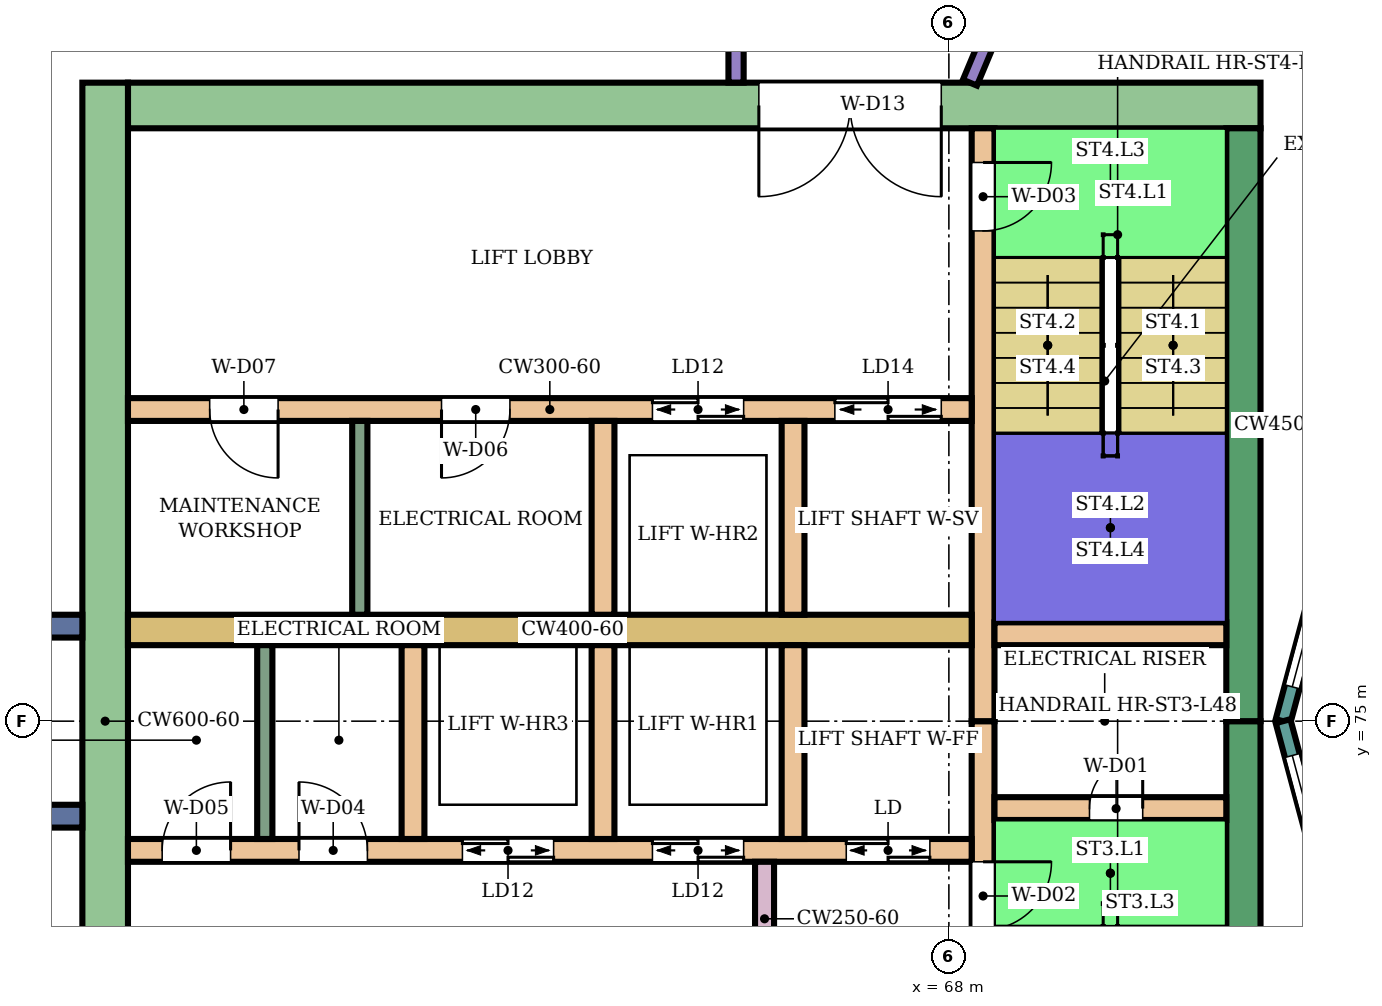
"""IFC4 building model, lengths in metres.
Left out: names, types, materials, properties, quantities, classifications, styles, units other than length and angle.
Written with IfcOpenShell. Run it as: python <this file> out.ifc"""

import sys

from ifc_helpers import new_model, si_unit, direction, frame, frame_2d, origin, place, context, subcontext, project, spatial, rectangle, extrude, element, fill, save


model = new_model("IFC4")
c1 = context("Model", 3, precision=1e-05, world=origin(), true_north=direction((0.0, 1.0)))
c2 = subcontext(c1, "Body", "Model", "MODEL_VIEW")
j1 = project(units=[si_unit("LENGTHUNIT", "METRE"), si_unit("PLANEANGLEUNIT", "RADIAN")], contexts=[c1])
p1 = place(None, origin())
s1 = spatial("IfcSite", under=j1, at=p1, CompositionType="ELEMENT")
p2 = place(p1, origin())
s2 = spatial("IfcBuilding", under=s1, at=p2, CompositionType="ELEMENT")
p3 = place(p2, frame((0.0, 0.0, 206.9)))
s3 = spatial("IfcBuildingStorey", under=s2, at=p3, CompositionType="ELEMENT", Elevation=206.9)
p4 = place(p3, frame((72.1, 83.1, 0.0), z_axis=(0.0, 0.0, 1.0), x_axis=(-1.0, 0.0, 0.0)))
e1 = element("IfcWall", 1, at=p4, inside=s3, PredefinedType="SHEAR", context=c2, shape_type="SweptSolid", body=[
    extrude(rectangle(XDim=14.9, YDim=0.6, at=frame_2d((7.45, 0.0))), origin(), (0.0, 0.0, 1.0), 5.28),
])
p5 = place(p4, frame((4.2, 0.0, 0.0)))
e2 = element("IfcOpeningElement", 2, at=p5, cuts=e1, PredefinedType="OPENING", context=c2, shape_type="SweptSolid", body=[
    extrude(rectangle(XDim=2.4, YDim=2.4, at=frame_2d((1.2, 1.2))), frame((0.0, 0.31, 0.0), z_axis=(0.0, -1.0, 0.0), x_axis=(1.0, 0.0, 0.0)), (0.0, 0.0, 1.0), 0.62),
])
for number, where, z_axis, x_axis in (
    (3, (71.875, 75.0, 0.0), (0.0, 0.0, 1.0), (0.0, -1.0, 0.0)),
    (4, (71.875, 82.8, 0.0), (0.0, 0.0, 1.0), (0.0, -1.0, 0.0)),
):
    element("IfcWall", number, at=place(p3, frame(where, z_axis=z_axis, x_axis=x_axis)), inside=s3, PredefinedType="SHEAR", context=c2, shape_type="SweptSolid", body=[
        extrude(rectangle(XDim=7.8, YDim=0.45, at=frame_2d((3.9, 0.0))), origin(), (0.0, 0.0, 1.0), 5.28),
    ])
p6 = place(p3, frame((56.9, 83.4, 0.0), z_axis=(0.0, 0.0, 1.0), x_axis=(0.0, -1.0, 0.0)))
e5 = element("IfcWall", 5, at=p6, inside=s3, PredefinedType="SHEAR", context=c2, shape_type="SweptSolid", body=[
    extrude(rectangle(XDim=16.8, YDim=0.6, at=frame_2d((8.4, 0.0))), origin(), (0.0, 0.0, 1.0), 5.28),
])
p7 = place(p3, frame((68.45, 75.0, 0.0), z_axis=(0.0, 0.0, 1.0), x_axis=(0.0, -1.0, 0.0)))
e6 = element("IfcWall", 6, at=p7, inside=s3, PredefinedType="SHEAR", context=c2, shape_type="SweptSolid", body=[
    extrude(rectangle(XDim=7.8, YDim=0.3, at=frame_2d((3.9, 0.0))), origin(), (0.0, 0.0, 1.0), 5.28),
])
p8 = place(p7, frame((1.85, 0.0, 0.0)))
e7 = element("IfcOpeningElement", 7, at=p8, cuts=e6, PredefinedType="OPENING", context=c2, shape_type="SweptSolid", body=[
    extrude(rectangle(XDim=0.9, YDim=2.1, at=frame_2d((0.45, 1.05))), frame((0.0, 0.16, 0.0), z_axis=(0.0, -1.0, 0.0), x_axis=(1.0, 0.0, 0.0)), (0.0, 0.0, 1.0), 0.32),
])
p9 = place(p3, frame((68.45, 82.8, 0.0), z_axis=(0.0, 0.0, 1.0), x_axis=(0.0, -1.0, 0.0)))
e8 = element("IfcWall", 8, at=p9, inside=s3, PredefinedType="SHEAR", context=c2, shape_type="SweptSolid", body=[
    extrude(rectangle(XDim=7.8, YDim=0.3, at=frame_2d((3.9, 0.0))), origin(), (0.0, 0.0, 1.0), 5.28),
])
p10 = place(p9, frame((0.45, 0.0, 0.0)))
e9 = element("IfcOpeningElement", 9, at=p10, cuts=e8, PredefinedType="OPENING", context=c2, shape_type="SweptSolid", body=[
    extrude(rectangle(XDim=0.9, YDim=2.1, at=frame_2d((0.45, 1.05))), frame((0.0, 0.16, 0.0), z_axis=(0.0, -1.0, 0.0), x_axis=(1.0, 0.0, 0.0)), (0.0, 0.0, 1.0), 0.32),
])
p11 = place(p3, frame((71.65, 73.85, 0.0), z_axis=(0.0, 0.0, 1.0), x_axis=(-1.0, 0.0, 0.0)))
e10 = element("IfcWall", 10, at=p11, inside=s3, PredefinedType="SHEAR", context=c2, shape_type="SweptSolid", body=[
    extrude(rectangle(XDim=3.05, YDim=0.3, at=frame_2d((1.525, 0.0))), origin(), (0.0, 0.0, 1.0), 5.28),
])
p12 = place(p11, frame((1.1, 0.0, 0.0)))
e11 = element("IfcOpeningElement", 11, at=p12, cuts=e10, PredefinedType="OPENING", context=c2, shape_type="SweptSolid", body=[
    extrude(rectangle(XDim=0.7, YDim=2.0, at=frame_2d((0.35, 1.0))), frame((0.0, 0.16, 0.0), z_axis=(0.0, -1.0, 0.0), x_axis=(1.0, 0.0, 0.0)), (0.0, 0.0, 1.0), 0.32),
])
p13 = place(p3, frame((71.65, 76.15, 0.0), z_axis=(0.0, 0.0, 1.0), x_axis=(-1.0, 0.0, 0.0)))
e12 = element("IfcWall", 12, at=p13, inside=s3, PredefinedType="SHEAR", context=c2, shape_type="SweptSolid", body=[
    extrude(rectangle(XDim=3.05, YDim=0.3, at=frame_2d((1.525, 0.0))), origin(), (0.0, 0.0, 1.0), 5.28),
])
p14 = place(p3, frame((68.3, 73.3, 0.0), z_axis=(0.0, 0.0, 1.0), x_axis=(-1.0, 0.0, 0.0)))
e13 = element("IfcWall", 13, at=p14, inside=s3, PredefinedType="SHEAR", context=c2, shape_type="SweptSolid", body=[
    extrude(rectangle(XDim=11.1, YDim=0.3, at=frame_2d((5.55, 0.0))), origin(), (0.0, 0.0, 1.0), 5.28),
])
p15 = place(p14, frame((0.55, 0.0, 0.0)))
e14 = element("IfcOpeningElement", 14, at=p15, cuts=e13, PredefinedType="OPENING", context=c2, shape_type="SweptSolid", body=[
    extrude(rectangle(XDim=1.1, YDim=2.1, at=frame_2d((0.55, 1.05))), frame((0.0, 0.16, 0.0), z_axis=(0.0, -1.0, 0.0), x_axis=(1.0, 0.0, 0.0)), (0.0, 0.0, 1.0), 0.32),
])
p16 = place(p14, frame((3.0, 0.0, 0.0)))
e15 = element("IfcOpeningElement", 15, at=p16, cuts=e13, PredefinedType="OPENING", context=c2, shape_type="SweptSolid", body=[
    extrude(rectangle(XDim=1.2, YDim=2.1, at=frame_2d((0.6, 1.05))), frame((0.0, 0.16, 0.0), z_axis=(0.0, -1.0, 0.0), x_axis=(1.0, 0.0, 0.0)), (0.0, 0.0, 1.0), 0.32),
])
p17 = place(p14, frame((5.5, 0.0, 0.0)))
e16 = element("IfcOpeningElement", 16, at=p17, cuts=e13, PredefinedType="OPENING", context=c2, shape_type="SweptSolid", body=[
    extrude(rectangle(XDim=1.2, YDim=2.1, at=frame_2d((0.6, 1.05))), frame((0.0, 0.16, 0.0), z_axis=(0.0, -1.0, 0.0), x_axis=(1.0, 0.0, 0.0)), (0.0, 0.0, 1.0), 0.32),
])
p18 = place(p14, frame((7.95, 0.0, 0.0)))
e17 = element("IfcOpeningElement", 17, at=p18, cuts=e13, PredefinedType="OPENING", context=c2, shape_type="SweptSolid", body=[
    extrude(rectangle(XDim=0.9, YDim=2.1, at=frame_2d((0.45, 1.05))), frame((0.0, 0.16, 0.0), z_axis=(0.0, -1.0, 0.0), x_axis=(1.0, 0.0, 0.0)), (0.0, 0.0, 1.0), 0.32),
])
p19 = place(p14, frame((9.75, 0.0, 0.0)))
e18 = element("IfcOpeningElement", 18, at=p19, cuts=e13, PredefinedType="OPENING", context=c2, shape_type="SweptSolid", body=[
    extrude(rectangle(XDim=0.9, YDim=2.1, at=frame_2d((0.45, 1.05))), frame((0.0, 0.16, 0.0), z_axis=(0.0, -1.0, 0.0), x_axis=(1.0, 0.0, 0.0)), (0.0, 0.0, 1.0), 0.32),
])
p20 = place(p3, frame((68.3, 76.2, 0.0), z_axis=(0.0, 0.0, 1.0), x_axis=(-1.0, 0.0, 0.0)))
e19 = element("IfcWall", 19, at=p20, inside=s3, PredefinedType="SHEAR", context=c2, shape_type="SweptSolid", body=[
    extrude(rectangle(XDim=11.1, YDim=0.4, at=frame_2d((5.55, 0.0))), origin(), (0.0, 0.0, 1.0), 5.28),
])
p21 = place(p3, frame((68.3, 79.1, 0.0), z_axis=(0.0, 0.0, 1.0), x_axis=(-1.0, 0.0, 0.0)))
e20 = element("IfcWall", 20, at=p21, inside=s3, PredefinedType="SHEAR", context=c2, shape_type="SweptSolid", body=[
    extrude(rectangle(XDim=11.1, YDim=0.3, at=frame_2d((5.55, 0.0))), origin(), (0.0, 0.0, 1.0), 5.28),
])
p22 = place(p21, frame((0.4, 0.0, 0.0)))
e21 = element("IfcOpeningElement", 21, at=p22, cuts=e20, PredefinedType="OPENING", context=c2, shape_type="SweptSolid", body=[
    extrude(rectangle(XDim=1.4, YDim=2.1, at=frame_2d((0.7, 1.05))), frame((0.0, 0.16, 0.0), z_axis=(0.0, -1.0, 0.0), x_axis=(1.0, 0.0, 0.0)), (0.0, 0.0, 1.0), 0.32),
])
p23 = place(p21, frame((3.0, 0.0, 0.0)))
e22 = element("IfcOpeningElement", 22, at=p23, cuts=e20, PredefinedType="OPENING", context=c2, shape_type="SweptSolid", body=[
    extrude(rectangle(XDim=1.2, YDim=2.1, at=frame_2d((0.6, 1.05))), frame((0.0, 0.16, 0.0), z_axis=(0.0, -1.0, 0.0), x_axis=(1.0, 0.0, 0.0)), (0.0, 0.0, 1.0), 0.32),
])
p24 = place(p21, frame((6.075, 0.0, 0.0)))
e23 = element("IfcOpeningElement", 23, at=p24, cuts=e20, PredefinedType="OPENING", context=c2, shape_type="SweptSolid", body=[
    extrude(rectangle(XDim=0.9, YDim=2.1, at=frame_2d((0.45, 1.05))), frame((0.0, 0.16, 0.0), z_axis=(0.0, -1.0, 0.0), x_axis=(1.0, 0.0, 0.0)), (0.0, 0.0, 1.0), 0.32),
])
p25 = place(p21, frame((9.125, 0.0, 0.0)))
e24 = element("IfcOpeningElement", 24, at=p25, cuts=e20, PredefinedType="OPENING", context=c2, shape_type="SweptSolid", body=[
    extrude(rectangle(XDim=0.9, YDim=2.1, at=frame_2d((0.45, 1.05))), frame((0.0, 0.16, 0.0), z_axis=(0.0, -1.0, 0.0), x_axis=(1.0, 0.0, 0.0)), (0.0, 0.0, 1.0), 0.32),
])
for number, where, z_axis, x_axis in (
    (25, (65.95, 76.0, 0.0), (0.0, 0.0, 1.0), (0.0, -1.0, 0.0)),
    (26, (63.45, 76.0, 0.0), (0.0, 0.0, 1.0), (0.0, -1.0, 0.0)),
    (27, (60.95, 76.0, 0.0), (0.0, 0.0, 1.0), (0.0, -1.0, 0.0)),
    (28, (65.95, 78.95, 0.0), (0.0, 0.0, 1.0), (0.0, -1.0, 0.0)),
    (29, (63.45, 78.95, 0.0), (0.0, 0.0, 1.0), (0.0, -1.0, 0.0)),
):
    element("IfcWall", number, at=place(p3, frame(where, z_axis=z_axis, x_axis=x_axis)), inside=s3, PredefinedType="SHEAR", context=c2, shape_type="SweptSolid", body=[
        extrude(rectangle(XDim=2.55, YDim=0.3, at=frame_2d((1.275, 0.0))), origin(), (0.0, 0.0, 1.0), 5.28),
    ])
p26 = place(p3, frame((65.575, 73.15, 0.0), z_axis=(0.0, 0.0, 1.0), x_axis=(0.0, -1.0, 0.0)))
e30 = element("IfcWall", 30, at=p26, inside=s3, PredefinedType="SHEAR", context=c2, shape_type="SweptSolid", body=[
    extrude(rectangle(XDim=1.5, YDim=0.25, at=frame_2d((0.75, 0.0))), origin(), (0.0, 0.0, 1.0), 5.28),
])
for number, where, z_axis, x_axis in (
    (31, (56.6, 76.25, 0.0), (0.0, 0.0, 1.0), (-1.0, 0.0, 0.0)),
    (32, (56.6, 73.75, 0.0), (0.0, 0.0, 1.0), (-1.0, 0.0, 0.0)),
):
    element("IfcWall", number, at=place(p3, frame(where, z_axis=z_axis, x_axis=x_axis)), inside=s3, PredefinedType="NOTDEFINED", context=c2, shape_type="SweptSolid", body=[
        extrude(rectangle(XDim=2.416, YDim=0.3, at=frame_2d((1.208, 0.0))), origin(), (0.0, 0.0, 1.0), 5.6),
    ])
p27 = place(p3, frame((73.415, 78.802, 0.0), z_axis=(0.0, 0.0, 1.0), x_axis=(-0.258789828301, -0.965933654434, 0.0)))
e33 = element("IfcWall", 33, at=p27, inside=s3, PredefinedType="NOTDEFINED", context=c2, shape_type="SweptSolid", body=[
    extrude(rectangle(XDim=3.936, YDim=0.2, at=frame_2d((1.968, 0.0))), origin(), (0.0, 0.0, 1.0), 5.6),
])
p28 = place(p27, frame((0.468, 0.0, 0.9)))
e34 = element("IfcOpeningElement", 34, at=p28, cuts=e33, PredefinedType="OPENING", context=c2, shape_type="SweptSolid", body=[
    extrude(rectangle(XDim=3.0, YDim=2.3, at=frame_2d((1.5, 1.15))), frame((0.0, 0.11, 0.0), z_axis=(0.0, -1.0, 0.0), x_axis=(1.0, 0.0, 0.0)), (0.0, 0.0, 1.0), 0.22),
])
p29 = place(p3, frame((72.396, 75.0, 0.0), z_axis=(0.0, 0.0, 1.0), x_axis=(0.258789828301, -0.965933654434, 0.0)))
e35 = element("IfcWall", 35, at=p29, inside=s3, PredefinedType="NOTDEFINED", context=c2, shape_type="SweptSolid", body=[
    extrude(rectangle(XDim=3.936, YDim=0.2, at=frame_2d((1.968, 0.0))), origin(), (0.0, 0.0, 1.0), 5.6),
])
p30 = place(p29, frame((0.468, 0.0, 0.9)))
e36 = element("IfcOpeningElement", 36, at=p30, cuts=e35, PredefinedType="OPENING", context=c2, shape_type="SweptSolid", body=[
    extrude(rectangle(XDim=3.0, YDim=2.3, at=frame_2d((1.5, 1.15))), frame((0.0, 0.11, 0.0), z_axis=(0.0, -1.0, 0.0), x_axis=(1.0, 0.0, 0.0)), (0.0, 0.0, 1.0), 0.22),
])
p31 = place(p3, frame((65.2, 83.401, 0.0), z_axis=(0.0, 0.0, 1.0), x_axis=(0.0, 1.0, 0.0)))
e37 = element("IfcWall", 37, at=p31, inside=s3, PredefinedType="PARTITIONING", context=c2, shape_type="SweptSolid", body=[
    extrude(rectangle(XDim=1.399, YDim=0.2, at=frame_2d((0.7, 0.0))), origin(), (0.0, 0.0, 1.0), 5.15),
])
p32 = place(p3, frame((68.277, 83.4, 0.0), z_axis=(0.0, 0.0, 1.0), x_axis=(0.386363382968, 0.922346646495, 0.0)))
e38 = element("IfcWall", 38, at=p32, inside=s3, PredefinedType="PARTITIONING", context=c2, shape_type="SweptSolid", body=[
    extrude(rectangle(XDim=7.762, YDim=0.2, at=frame_2d((3.881, 0.0))), origin(), (0.0, 0.0, 1.0), 5.15),
])
p33 = place(p32, frame((3.15, 0.0, 0.0)))
e39 = element("IfcOpeningElement", 39, at=p33, cuts=e38, PredefinedType="OPENING", context=c2, shape_type="SweptSolid", body=[
    extrude(rectangle(XDim=1.2, YDim=2.4, at=frame_2d((0.6, 1.2))), frame((0.0, 0.11, 0.0), z_axis=(0.0, -1.0, 0.0), x_axis=(1.0, 0.0, 0.0)), (0.0, 0.0, 1.0), 0.22),
])
p34 = place(p3, frame((71.264, 90.135, 0.0), z_axis=(0.0, 0.0, 1.0), x_axis=(0.499888168256, -0.866089960245, 0.0)))
e40 = element("IfcWall", 40, at=p34, inside=s3, PredefinedType="PARTITIONING", context=c2, shape_type="SweptSolid", body=[
    extrude(rectangle(XDim=9.778, YDim=0.2, at=frame_2d((4.889, 0.0))), origin(), (0.0, 0.0, 1.0), 5.15),
])
for number, where, z_axis, x_axis in (
    (41, (59.0, 76.0, 0.0), (0.0, 0.0, 1.0), (0.0, -1.0, 0.0)),
    (42, (60.25, 78.95, 0.0), (0.0, 0.0, 1.0), (0.0, -1.0, 0.0)),
):
    element("IfcWall", number, at=place(p3, frame(where, z_axis=z_axis, x_axis=x_axis)), inside=s3, PredefinedType="PARTITIONING", context=c2, shape_type="SweptSolid", body=[
        extrude(rectangle(XDim=2.55, YDim=0.2, at=frame_2d((1.275, 0.0))), origin(), (0.0, 0.0, 1.0), 5.28),
    ])
p35 = place(p28, origin())
e43 = element("IfcWindow", 43, at=p35, inside=s3, PartitioningType="SINGLE_PANEL", PredefinedType="WINDOW", context=c2, shape_type="SweptSolid", body=[
    extrude(rectangle(XDim=3.0, YDim=2.3, at=frame_2d((1.5, 1.15))), frame((0.0, 0.03, 0.0), z_axis=(0.0, -1.0, 0.0), x_axis=(1.0, 0.0, 0.0)), (0.0, 0.0, 1.0), 0.06),
])
fill(e34, e43)
p36 = place(p30, origin())
e44 = element("IfcWindow", 44, at=p36, inside=s3, PartitioningType="SINGLE_PANEL", PredefinedType="WINDOW", context=c2, shape_type="SweptSolid", body=[
    extrude(rectangle(XDim=3.0, YDim=2.3, at=frame_2d((1.5, 1.15))), frame((0.0, 0.03, 0.0), z_axis=(0.0, -1.0, 0.0), x_axis=(1.0, 0.0, 0.0)), (0.0, 0.0, 1.0), 0.06),
])
fill(e36, e44)
p37 = place(p12, frame((0.7, 0.0, 0.0), z_axis=(0.0, 0.0, 1.0), x_axis=(-1.0, 0.0, 0.0)))
e45 = element("IfcDoor", 45, at=p37, inside=s3, OperationType="SINGLE_SWING_RIGHT", PredefinedType="DOOR", context=c2, shape_type="SweptSolid", body=[
    extrude(rectangle(XDim=0.7, YDim=2.0, at=frame_2d((0.35, 1.0))), frame((0.0, 0.025, 0.0), z_axis=(0.0, -1.0, 0.0), x_axis=(1.0, 0.0, 0.0)), (0.0, 0.0, 1.0), 0.05),
])
fill(e11, e45)
p38 = place(p8, origin())
e46 = element("IfcDoor", 46, at=p38, inside=s3, OperationType="SINGLE_SWING_LEFT", PredefinedType="DOOR", context=c2, shape_type="SweptSolid", body=[
    extrude(rectangle(XDim=0.9, YDim=2.1, at=frame_2d((0.45, 1.05))), frame((0.0, 0.025, 0.0), z_axis=(0.0, -1.0, 0.0), x_axis=(1.0, 0.0, 0.0)), (0.0, 0.0, 1.0), 0.05),
])
fill(e7, e46)
p39 = place(p10, origin())
e47 = element("IfcDoor", 47, at=p39, inside=s3, OperationType="SINGLE_SWING_LEFT", PredefinedType="DOOR", context=c2, shape_type="SweptSolid", body=[
    extrude(rectangle(XDim=0.9, YDim=2.1, at=frame_2d((0.45, 1.05))), frame((0.0, 0.025, 0.0), z_axis=(0.0, -1.0, 0.0), x_axis=(1.0, 0.0, 0.0)), (0.0, 0.0, 1.0), 0.05),
])
fill(e9, e47)
p40 = place(p15, origin())
e48 = element("IfcDoor", 48, at=p40, inside=s3, OperationType="DOUBLE_DOOR_SLIDING", PredefinedType="DOOR", context=c2, shape_type="SweptSolid", body=[
    extrude(rectangle(XDim=1.1, YDim=2.1, at=frame_2d((0.55, 1.05))), frame((0.0, 0.025, 0.0), z_axis=(0.0, -1.0, 0.0), x_axis=(1.0, 0.0, 0.0)), (0.0, 0.0, 1.0), 0.05),
])
fill(e14, e48)
p41 = place(p16, origin())
e49 = element("IfcDoor", 49, at=p41, inside=s3, OperationType="DOUBLE_DOOR_SLIDING", PredefinedType="DOOR", context=c2, shape_type="SweptSolid", body=[
    extrude(rectangle(XDim=1.2, YDim=2.1, at=frame_2d((0.6, 1.05))), frame((0.0, 0.025, 0.0), z_axis=(0.0, -1.0, 0.0), x_axis=(1.0, 0.0, 0.0)), (0.0, 0.0, 1.0), 0.05),
])
fill(e15, e49)
p42 = place(p17, origin())
e50 = element("IfcDoor", 50, at=p42, inside=s3, OperationType="DOUBLE_DOOR_SLIDING", PredefinedType="DOOR", context=c2, shape_type="SweptSolid", body=[
    extrude(rectangle(XDim=1.2, YDim=2.1, at=frame_2d((0.6, 1.05))), frame((0.0, 0.025, 0.0), z_axis=(0.0, -1.0, 0.0), x_axis=(1.0, 0.0, 0.0)), (0.0, 0.0, 1.0), 0.05),
])
fill(e16, e50)
p43 = place(p18, frame((0.9, 0.0, 0.0), z_axis=(0.0, 0.0, 1.0), x_axis=(-1.0, 0.0, 0.0)))
e51 = element("IfcDoor", 51, at=p43, inside=s3, OperationType="SINGLE_SWING_LEFT", PredefinedType="DOOR", context=c2, shape_type="SweptSolid", body=[
    extrude(rectangle(XDim=0.9, YDim=2.1, at=frame_2d((0.45, 1.05))), frame((0.0, 0.025, 0.0), z_axis=(0.0, -1.0, 0.0), x_axis=(1.0, 0.0, 0.0)), (0.0, 0.0, 1.0), 0.05),
])
fill(e17, e51)
p44 = place(p19, frame((0.9, 0.0, 0.0), z_axis=(0.0, 0.0, 1.0), x_axis=(-1.0, 0.0, 0.0)))
e52 = element("IfcDoor", 52, at=p44, inside=s3, OperationType="SINGLE_SWING_RIGHT", PredefinedType="DOOR", context=c2, shape_type="SweptSolid", body=[
    extrude(rectangle(XDim=0.9, YDim=2.1, at=frame_2d((0.45, 1.05))), frame((0.0, 0.025, 0.0), z_axis=(0.0, -1.0, 0.0), x_axis=(1.0, 0.0, 0.0)), (0.0, 0.0, 1.0), 0.05),
])
fill(e18, e52)
p45 = place(p22, origin())
e53 = element("IfcDoor", 53, at=p45, inside=s3, OperationType="DOUBLE_DOOR_SLIDING", PredefinedType="DOOR", context=c2, shape_type="SweptSolid", body=[
    extrude(rectangle(XDim=1.4, YDim=2.1, at=frame_2d((0.7, 1.05))), frame((0.0, 0.025, 0.0), z_axis=(0.0, -1.0, 0.0), x_axis=(1.0, 0.0, 0.0)), (0.0, 0.0, 1.0), 0.05),
])
fill(e21, e53)
p46 = place(p23, origin())
e54 = element("IfcDoor", 54, at=p46, inside=s3, OperationType="DOUBLE_DOOR_SLIDING", PredefinedType="DOOR", context=c2, shape_type="SweptSolid", body=[
    extrude(rectangle(XDim=1.2, YDim=2.1, at=frame_2d((0.6, 1.05))), frame((0.0, 0.025, 0.0), z_axis=(0.0, -1.0, 0.0), x_axis=(1.0, 0.0, 0.0)), (0.0, 0.0, 1.0), 0.05),
])
fill(e22, e54)
p47 = place(p24, origin())
e55 = element("IfcDoor", 55, at=p47, inside=s3, OperationType="SINGLE_SWING_RIGHT", PredefinedType="DOOR", context=c2, shape_type="SweptSolid", body=[
    extrude(rectangle(XDim=0.9, YDim=2.1, at=frame_2d((0.45, 1.05))), frame((0.0, 0.025, 0.0), z_axis=(0.0, -1.0, 0.0), x_axis=(1.0, 0.0, 0.0)), (0.0, 0.0, 1.0), 0.05),
])
fill(e23, e55)
p48 = place(p25, origin())
e56 = element("IfcDoor", 56, at=p48, inside=s3, OperationType="SINGLE_SWING_LEFT", PredefinedType="DOOR", context=c2, shape_type="SweptSolid", body=[
    extrude(rectangle(XDim=0.9, YDim=2.1, at=frame_2d((0.45, 1.05))), frame((0.0, 0.025, 0.0), z_axis=(0.0, -1.0, 0.0), x_axis=(1.0, 0.0, 0.0)), (0.0, 0.0, 1.0), 0.05),
])
fill(e24, e56)
p49 = place(p5, origin())
e57 = element("IfcDoor", 57, at=p49, inside=s3, OperationType="DOUBLE_DOOR_SINGLE_SWING", PredefinedType="DOOR", context=c2, shape_type="SweptSolid", body=[
    extrude(rectangle(XDim=2.4, YDim=2.4, at=frame_2d((1.2, 1.2))), frame((0.0, 0.025, 0.0), z_axis=(0.0, -1.0, 0.0), x_axis=(1.0, 0.0, 0.0)), (0.0, 0.0, 1.0), 0.05),
])
fill(e2, e57)
save(model, sys.argv[1])
